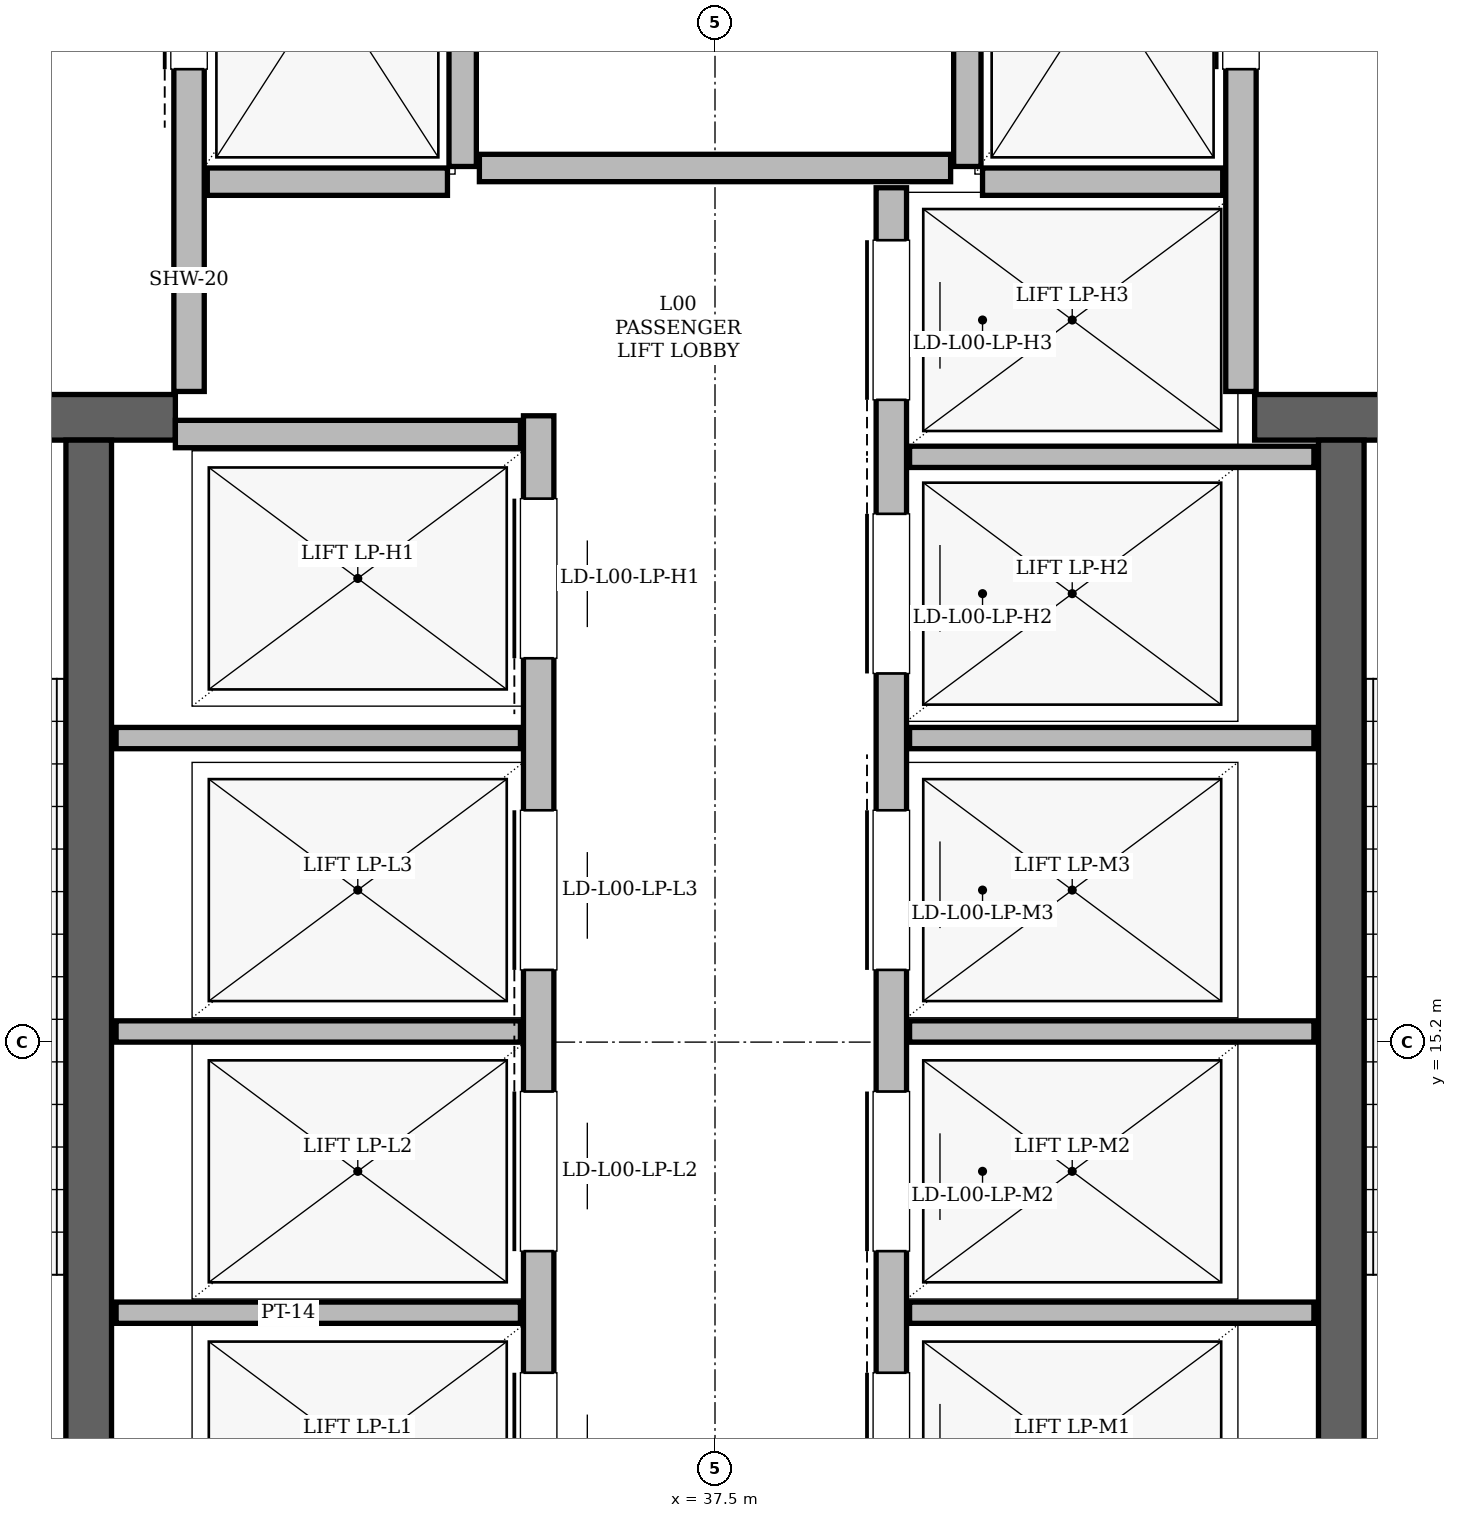
"""IFC4 building model, lengths in metres.
Left out: names, types, materials, properties, quantities, classifications, styles, units other than length and angle.
Written with IfcOpenShell. Run it as: python <this file> out.ifc"""

import sys

from ifc_helpers import new_model, si_unit, direction, frame, frame_2d, origin, place, context, subcontext, project, spatial, rectangle, extrude, element, fill, save


model = new_model("IFC4")
c1 = context("Model", 3, precision=1e-05, world=origin(), true_north=direction((0.0, 1.0)))
c2 = subcontext(c1, "Body", "Model", "MODEL_VIEW")
j1 = project(units=[si_unit("LENGTHUNIT", "METRE"), si_unit("PLANEANGLEUNIT", "RADIAN")], contexts=[c1])
p1 = place(None, origin())
s1 = spatial("IfcSite", under=j1, at=p1, CompositionType="ELEMENT")
p2 = place(p1, origin())
s2 = spatial("IfcBuilding", under=s1, at=p2, CompositionType="ELEMENT")
p3 = place(p2, origin())
s3 = spatial("IfcBuildingStorey", under=s2, at=p3, CompositionType="ELEMENT", Elevation=0.0)
p4 = place(p3, frame((29.94, 19.31, 0.0), z_axis=(0.0, 0.0, 1.0), x_axis=(1.0, 0.0, 0.0)))
e1 = element("IfcWall", 1, at=p4, inside=s3, PredefinedType="SHEAR", context=c2, shape_type="SweptSolid", body=[
    extrude(rectangle(XDim=4.01, YDim=0.3, at=frame_2d((2.005, 0.0))), origin(), (0.0, 0.0, 1.0), 5.12),
])
p5 = place(p4, frame((1.01, 0.0, 0.0)))
e2 = element("IfcOpeningElement", 2, at=p5, cuts=e1, PredefinedType="OPENING", context=c2, shape_type="SweptSolid", body=[
    extrude(rectangle(XDim=1.4, YDim=2.2, at=frame_2d((0.7, 1.1))), frame((0.0, 0.15, 0.0), z_axis=(0.0, -1.0, 0.0), x_axis=(1.0, 0.0, 0.0)), (0.0, 0.0, 1.0), 0.3),
])
p6 = place(p3, frame((41.05, 19.31, 0.0), z_axis=(0.0, 0.0, 1.0), x_axis=(1.0, 0.0, 0.0)))
e3 = element("IfcWall", 3, at=p6, inside=s3, PredefinedType="SHEAR", context=c2, shape_type="SweptSolid", body=[
    extrude(rectangle(XDim=4.01, YDim=0.3, at=frame_2d((2.005, 0.0))), origin(), (0.0, 0.0, 1.0), 5.12),
])
p7 = place(p6, frame((1.6, 0.0, 0.0)))
e4 = element("IfcOpeningElement", 4, at=p7, cuts=e3, PredefinedType="OPENING", context=c2, shape_type="SweptSolid", body=[
    extrude(rectangle(XDim=1.4, YDim=2.2, at=frame_2d((0.7, 1.1))), frame((0.0, 0.15, 0.0), z_axis=(0.0, -1.0, 0.0), x_axis=(1.0, 0.0, 0.0)), (0.0, 0.0, 1.0), 0.3),
])
for number, where, z_axis, x_axis in (
    (5, (33.38, 11.54, 0.0), (0.0, 0.0, 1.0), (0.0, 1.0, 0.0)),
    (6, (41.62, 11.54, 0.0), (0.0, 0.0, 1.0), (0.0, 1.0, 0.0)),
):
    element("IfcWall", number, at=place(p3, frame(where, z_axis=z_axis, x_axis=x_axis)), inside=s3, PredefinedType="SHEAR", context=c2, shape_type="SweptSolid", body=[
        extrude(rectangle(XDim=7.62, YDim=0.3, at=frame_2d((3.81, 0.0))), origin(), (0.0, 0.0, 1.0), 5.12),
    ])
p8 = place(p3, frame((34.04, 19.48, 0.0), z_axis=(0.0, 0.0, 1.0), x_axis=(0.0, 1.0, 0.0)))
e7 = element("IfcWall", 7, at=p8, inside=s3, PredefinedType="PARTITIONING", context=c2, shape_type="SweptSolid", body=[
    extrude(rectangle(XDim=4.5, YDim=0.2, at=frame_2d((2.25, 0.0))), origin(), (0.0, 0.0, 1.0), 4.16),
])
p9 = place(p8, frame((2.12, 0.0, 0.0)))
e8 = element("IfcOpeningElement", 8, at=p9, cuts=e7, PredefinedType="OPENING", context=c2, shape_type="SweptSolid", body=[
    extrude(rectangle(XDim=1.1, YDim=2.2, at=frame_2d((0.55, 1.1))), frame((0.0, 0.1, 0.0), z_axis=(0.0, -1.0, 0.0), x_axis=(1.0, 0.0, 0.0)), (0.0, 0.0, 1.0), 0.2),
])
p10 = place(p3, frame((35.84, 20.96, 0.0), z_axis=(0.0, 0.0, 1.0), x_axis=(0.0, 1.0, 0.0)))
e9 = element("IfcWall", 9, at=p10, inside=s3, PredefinedType="PARTITIONING", context=c2, shape_type="SweptSolid", body=[
    extrude(rectangle(XDim=3.02, YDim=0.18, at=frame_2d((1.51, 0.0))), origin(), (0.0, 0.0, 1.0), 4.16),
])
p11 = place(p3, frame((34.16, 20.86, 0.0), z_axis=(0.0, 0.0, 1.0), x_axis=(1.0, 0.0, 0.0)))
e10 = element("IfcWall", 10, at=p11, inside=s3, PredefinedType="PARTITIONING", context=c2, shape_type="SweptSolid", body=[
    extrude(rectangle(XDim=1.58, YDim=0.18, at=frame_2d((0.79, 0.0))), origin(), (0.0, 0.0, 1.0), 5.12),
])
p12 = place(p3, frame((40.96, 19.48, 0.0), z_axis=(0.0, 0.0, 1.0), x_axis=(0.0, 1.0, 0.0)))
e11 = element("IfcWall", 11, at=p12, inside=s3, PredefinedType="PARTITIONING", context=c2, shape_type="SweptSolid", body=[
    extrude(rectangle(XDim=4.5, YDim=0.2, at=frame_2d((2.25, 0.0))), origin(), (0.0, 0.0, 1.0), 4.16),
])
p13 = place(p12, frame((2.12, 0.0, 0.0)))
e12 = element("IfcOpeningElement", 12, at=p13, cuts=e11, PredefinedType="OPENING", context=c2, shape_type="SweptSolid", body=[
    extrude(rectangle(XDim=1.1, YDim=2.2, at=frame_2d((0.55, 1.1))), frame((0.0, 0.1, 0.0), z_axis=(0.0, -1.0, 0.0), x_axis=(1.0, 0.0, 0.0)), (0.0, 0.0, 1.0), 0.2),
])
p14 = place(p3, frame((39.16, 20.96, 0.0), z_axis=(0.0, 0.0, 1.0), x_axis=(0.0, 1.0, 0.0)))
e13 = element("IfcWall", 13, at=p14, inside=s3, PredefinedType="PARTITIONING", context=c2, shape_type="SweptSolid", body=[
    extrude(rectangle(XDim=3.02, YDim=0.18, at=frame_2d((1.51, 0.0))), origin(), (0.0, 0.0, 1.0), 4.16),
])
p15 = place(p3, frame((39.26, 20.86, 0.0), z_axis=(0.0, 0.0, 1.0), x_axis=(1.0, 0.0, 0.0)))
e14 = element("IfcWall", 14, at=p15, inside=s3, PredefinedType="PARTITIONING", context=c2, shape_type="SweptSolid", body=[
    extrude(rectangle(XDim=1.58, YDim=0.18, at=frame_2d((0.79, 0.0))), origin(), (0.0, 0.0, 1.0), 5.12),
])
p16 = place(p3, frame((36.34, 11.72, 0.0), z_axis=(0.0, 0.0, 1.0), x_axis=(0.0, 1.0, 0.0)))
e15 = element("IfcWall", 15, at=p16, inside=s3, PredefinedType="PARTITIONING", context=c2, shape_type="SweptSolid", body=[
    extrude(rectangle(XDim=7.6, YDim=0.2, at=frame_2d((3.8, 0.0))), origin(), (0.0, 0.0, 1.0), 5.12),
])
p17 = place(p16, frame((0.255, 0.0, 0.0)))
e16 = element("IfcOpeningElement", 16, at=p17, cuts=e15, PredefinedType="OPENING", context=c2, shape_type="SweptSolid", body=[
    extrude(rectangle(XDim=1.05, YDim=2.15, at=frame_2d((0.525, 1.075))), frame((0.0, 0.1, 0.0), z_axis=(0.0, -1.0, 0.0), x_axis=(1.0, 0.0, 0.0)), (0.0, 0.0, 1.0), 0.2),
])
p18 = place(p16, frame((2.105, 0.0, 0.0)))
e17 = element("IfcOpeningElement", 17, at=p18, cuts=e15, PredefinedType="OPENING", context=c2, shape_type="SweptSolid", body=[
    extrude(rectangle(XDim=1.05, YDim=2.15, at=frame_2d((0.525, 1.075))), frame((0.0, 0.1, 0.0), z_axis=(0.0, -1.0, 0.0), x_axis=(1.0, 0.0, 0.0)), (0.0, 0.0, 1.0), 0.2),
])
p19 = place(p16, frame((3.955, 0.0, 0.0)))
e18 = element("IfcOpeningElement", 18, at=p19, cuts=e15, PredefinedType="OPENING", context=c2, shape_type="SweptSolid", body=[
    extrude(rectangle(XDim=1.05, YDim=2.15, at=frame_2d((0.525, 1.075))), frame((0.0, 0.1, 0.0), z_axis=(0.0, -1.0, 0.0), x_axis=(1.0, 0.0, 0.0)), (0.0, 0.0, 1.0), 0.2),
])
p20 = place(p16, frame((6.005, 0.0, 0.0)))
e19 = element("IfcOpeningElement", 19, at=p20, cuts=e15, PredefinedType="OPENING", context=c2, shape_type="SweptSolid", body=[
    extrude(rectangle(XDim=1.05, YDim=2.15, at=frame_2d((0.525, 1.075))), frame((0.0, 0.1, 0.0), z_axis=(0.0, -1.0, 0.0), x_axis=(1.0, 0.0, 0.0)), (0.0, 0.0, 1.0), 0.2),
])
p21 = place(p3, frame((33.95, 19.2, 0.0), z_axis=(0.0, 0.0, 1.0), x_axis=(1.0, 0.0, 0.0)))
e20 = element("IfcWall", 20, at=p21, inside=s3, PredefinedType="PARTITIONING", context=c2, shape_type="SweptSolid", body=[
    extrude(rectangle(XDim=2.27, YDim=0.18, at=frame_2d((1.135, 0.0))), origin(), (0.0, 0.0, 1.0), 5.12),
])
for number, where, z_axis, x_axis in (
    (21, (33.56, 13.42, 0.0), (0.0, 0.0, 1.0), (1.0, 0.0, 0.0)),
    (22, (33.56, 15.27, 0.0), (0.0, 0.0, 1.0), (1.0, 0.0, 0.0)),
    (23, (33.56, 17.2, 0.0), (0.0, 0.0, 1.0), (1.0, 0.0, 0.0)),
):
    element("IfcWall", number, at=place(p3, frame(where, z_axis=z_axis, x_axis=x_axis)), inside=s3, PredefinedType="PARTITIONING", context=c2, shape_type="SweptSolid", body=[
        extrude(rectangle(XDim=2.66, YDim=0.14, at=frame_2d((1.33, 0.0))), origin(), (0.0, 0.0, 1.0), 5.12),
    ])
p22 = place(p3, frame((38.66, 11.72, 0.0), z_axis=(0.0, 0.0, 1.0), x_axis=(0.0, 1.0, 0.0)))
e24 = element("IfcWall", 24, at=p22, inside=s3, PredefinedType="PARTITIONING", context=c2, shape_type="SweptSolid", body=[
    extrude(rectangle(XDim=9.1, YDim=0.2, at=frame_2d((4.55, 0.0))), origin(), (0.0, 0.0, 1.0), 5.12),
])
p23 = place(p22, frame((0.255, 0.0, 0.0)))
e25 = element("IfcOpeningElement", 25, at=p23, cuts=e24, PredefinedType="OPENING", context=c2, shape_type="SweptSolid", body=[
    extrude(rectangle(XDim=1.05, YDim=2.15, at=frame_2d((0.525, 1.075))), frame((0.0, 0.1, 0.0), z_axis=(0.0, -1.0, 0.0), x_axis=(1.0, 0.0, 0.0)), (0.0, 0.0, 1.0), 0.2),
])
p24 = place(p22, frame((2.105, 0.0, 0.0)))
e26 = element("IfcOpeningElement", 26, at=p24, cuts=e24, PredefinedType="OPENING", context=c2, shape_type="SweptSolid", body=[
    extrude(rectangle(XDim=1.05, YDim=2.15, at=frame_2d((0.525, 1.075))), frame((0.0, 0.1, 0.0), z_axis=(0.0, -1.0, 0.0), x_axis=(1.0, 0.0, 0.0)), (0.0, 0.0, 1.0), 0.2),
])
p25 = place(p22, frame((3.955, 0.0, 0.0)))
e27 = element("IfcOpeningElement", 27, at=p25, cuts=e24, PredefinedType="OPENING", context=c2, shape_type="SweptSolid", body=[
    extrude(rectangle(XDim=1.05, YDim=2.15, at=frame_2d((0.525, 1.075))), frame((0.0, 0.1, 0.0), z_axis=(0.0, -1.0, 0.0), x_axis=(1.0, 0.0, 0.0)), (0.0, 0.0, 1.0), 0.2),
])
p26 = place(p22, frame((5.905, 0.0, 0.0)))
e28 = element("IfcOpeningElement", 28, at=p26, cuts=e24, PredefinedType="OPENING", context=c2, shape_type="SweptSolid", body=[
    extrude(rectangle(XDim=1.05, YDim=2.15, at=frame_2d((0.525, 1.075))), frame((0.0, 0.1, 0.0), z_axis=(0.0, -1.0, 0.0), x_axis=(1.0, 0.0, 0.0)), (0.0, 0.0, 1.0), 0.2),
])
p27 = place(p22, frame((7.705, 0.0, 0.0)))
e29 = element("IfcOpeningElement", 29, at=p27, cuts=e24, PredefinedType="OPENING", context=c2, shape_type="SweptSolid", body=[
    extrude(rectangle(XDim=1.05, YDim=2.15, at=frame_2d((0.525, 1.075))), frame((0.0, 0.1, 0.0), z_axis=(0.0, -1.0, 0.0), x_axis=(1.0, 0.0, 0.0)), (0.0, 0.0, 1.0), 0.2),
])
for number, where, z_axis, x_axis in (
    (30, (38.78, 13.42, 0.0), (0.0, 0.0, 1.0), (1.0, 0.0, 0.0)),
    (31, (38.78, 15.27, 0.0), (0.0, 0.0, 1.0), (1.0, 0.0, 0.0)),
    (32, (38.78, 17.2, 0.0), (0.0, 0.0, 1.0), (1.0, 0.0, 0.0)),
    (33, (38.78, 19.05, 0.0), (0.0, 0.0, 1.0), (1.0, 0.0, 0.0)),
):
    element("IfcWall", number, at=place(p3, frame(where, z_axis=z_axis, x_axis=x_axis)), inside=s3, PredefinedType="PARTITIONING", context=c2, shape_type="SweptSolid", body=[
        extrude(rectangle(XDim=2.66, YDim=0.14, at=frame_2d((1.33, 0.0))), origin(), (0.0, 0.0, 1.0), 5.12),
    ])
p28 = place(p3, frame((35.95, 20.95, 0.0), z_axis=(0.0, 0.0, 1.0), x_axis=(1.0, 0.0, 0.0)))
e34 = element("IfcWall", 34, at=p28, inside=s3, PredefinedType="PARTITIONING", context=c2, shape_type="SweptSolid", body=[
    extrude(rectangle(XDim=3.1, YDim=0.18, at=frame_2d((1.55, 0.0))), origin(), (0.0, 0.0, 1.0), 5.12),
])
p29 = place(p9, origin())
e35 = element("IfcDoor", 35, at=p29, inside=s3, OperationType="SLIDING_TO_LEFT", PredefinedType="DOOR", context=c2, shape_type="SweptSolid", body=[
    extrude(rectangle(XDim=1.1, YDim=2.2, at=frame_2d((0.55, 1.1))), frame((0.0, 0.025, 0.0), z_axis=(0.0, -1.0, 0.0), x_axis=(1.0, 0.0, 0.0)), (0.0, 0.0, 1.0), 0.05),
])
fill(e8, e35)
p30 = place(p13, origin())
e36 = element("IfcDoor", 36, at=p30, inside=s3, OperationType="SLIDING_TO_RIGHT", PredefinedType="DOOR", context=c2, shape_type="SweptSolid", body=[
    extrude(rectangle(XDim=1.1, YDim=2.2, at=frame_2d((0.55, 1.1))), frame((0.0, 0.025, 0.0), z_axis=(0.0, -1.0, 0.0), x_axis=(1.0, 0.0, 0.0)), (0.0, 0.0, 1.0), 0.05),
])
fill(e12, e36)
p31 = place(p17, origin())
e37 = element("IfcDoor", 37, at=p31, inside=s3, OperationType="SLIDING_TO_LEFT", PredefinedType="DOOR", context=c2, shape_type="SweptSolid", body=[
    extrude(rectangle(XDim=1.05, YDim=2.15, at=frame_2d((0.525, 1.075))), frame((0.0, 0.025, 0.0), z_axis=(0.0, -1.0, 0.0), x_axis=(1.0, 0.0, 0.0)), (0.0, 0.0, 1.0), 0.05),
])
fill(e16, e37)
p32 = place(p18, origin())
e38 = element("IfcDoor", 38, at=p32, inside=s3, OperationType="SLIDING_TO_RIGHT", PredefinedType="DOOR", context=c2, shape_type="SweptSolid", body=[
    extrude(rectangle(XDim=1.05, YDim=2.15, at=frame_2d((0.525, 1.075))), frame((0.0, 0.025, 0.0), z_axis=(0.0, -1.0, 0.0), x_axis=(1.0, 0.0, 0.0)), (0.0, 0.0, 1.0), 0.05),
])
fill(e17, e38)
p33 = place(p19, origin())
e39 = element("IfcDoor", 39, at=p33, inside=s3, OperationType="SLIDING_TO_LEFT", PredefinedType="DOOR", context=c2, shape_type="SweptSolid", body=[
    extrude(rectangle(XDim=1.05, YDim=2.15, at=frame_2d((0.525, 1.075))), frame((0.0, 0.025, 0.0), z_axis=(0.0, -1.0, 0.0), x_axis=(1.0, 0.0, 0.0)), (0.0, 0.0, 1.0), 0.05),
])
fill(e18, e39)
p34 = place(p23, origin())
e40 = element("IfcDoor", 40, at=p34, inside=s3, OperationType="SLIDING_TO_RIGHT", PredefinedType="DOOR", context=c2, shape_type="SweptSolid", body=[
    extrude(rectangle(XDim=1.05, YDim=2.15, at=frame_2d((0.525, 1.075))), frame((0.0, 0.025, 0.0), z_axis=(0.0, -1.0, 0.0), x_axis=(1.0, 0.0, 0.0)), (0.0, 0.0, 1.0), 0.05),
])
fill(e25, e40)
p35 = place(p24, origin())
e41 = element("IfcDoor", 41, at=p35, inside=s3, OperationType="SLIDING_TO_LEFT", PredefinedType="DOOR", context=c2, shape_type="SweptSolid", body=[
    extrude(rectangle(XDim=1.05, YDim=2.15, at=frame_2d((0.525, 1.075))), frame((0.0, 0.025, 0.0), z_axis=(0.0, -1.0, 0.0), x_axis=(1.0, 0.0, 0.0)), (0.0, 0.0, 1.0), 0.05),
])
fill(e26, e41)
p36 = place(p25, origin())
e42 = element("IfcDoor", 42, at=p36, inside=s3, OperationType="SLIDING_TO_RIGHT", PredefinedType="DOOR", context=c2, shape_type="SweptSolid", body=[
    extrude(rectangle(XDim=1.05, YDim=2.15, at=frame_2d((0.525, 1.075))), frame((0.0, 0.025, 0.0), z_axis=(0.0, -1.0, 0.0), x_axis=(1.0, 0.0, 0.0)), (0.0, 0.0, 1.0), 0.05),
])
fill(e27, e42)
p37 = place(p20, origin())
e43 = element("IfcDoor", 43, at=p37, inside=s3, OperationType="SLIDING_TO_LEFT", PredefinedType="DOOR", context=c2, shape_type="SweptSolid", body=[
    extrude(rectangle(XDim=1.05, YDim=2.15, at=frame_2d((0.525, 1.075))), frame((0.0, 0.025, 0.0), z_axis=(0.0, -1.0, 0.0), x_axis=(1.0, 0.0, 0.0)), (0.0, 0.0, 1.0), 0.05),
])
fill(e19, e43)
p38 = place(p26, origin())
e44 = element("IfcDoor", 44, at=p38, inside=s3, OperationType="SLIDING_TO_RIGHT", PredefinedType="DOOR", context=c2, shape_type="SweptSolid", body=[
    extrude(rectangle(XDim=1.05, YDim=2.15, at=frame_2d((0.525, 1.075))), frame((0.0, 0.025, 0.0), z_axis=(0.0, -1.0, 0.0), x_axis=(1.0, 0.0, 0.0)), (0.0, 0.0, 1.0), 0.05),
])
fill(e28, e44)
p39 = place(p27, origin())
e45 = element("IfcDoor", 45, at=p39, inside=s3, OperationType="SLIDING_TO_LEFT", PredefinedType="DOOR", context=c2, shape_type="SweptSolid", body=[
    extrude(rectangle(XDim=1.05, YDim=2.15, at=frame_2d((0.525, 1.075))), frame((0.0, 0.025, 0.0), z_axis=(0.0, -1.0, 0.0), x_axis=(1.0, 0.0, 0.0)), (0.0, 0.0, 1.0), 0.05),
])
fill(e29, e45)
save(model, sys.argv[1])
